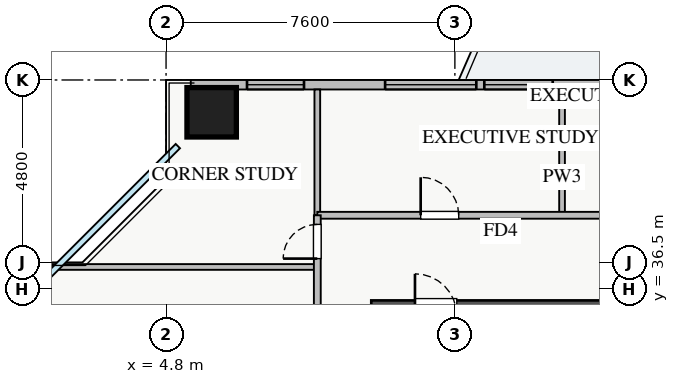
"""IFC4 building model, lengths in metres.
Left out: names, types, materials, properties, quantities, classifications, styles, units other than length and angle.
Written with IfcOpenShell. Run it as: python <this file> out.ifc"""

import sys

from ifc_helpers import new_model, si_unit, direction, frame, frame_2d, origin, origin_2d, place, context, subcontext, project, spatial, rectangle, extrude, source, transform, mapped, element, fill, save


model = new_model("IFC4")
c1 = context("Model", 3, precision=1e-05, world=origin(), true_north=direction((0.0, 1.0)))
c2 = subcontext(c1, "Body", "Model", "MODEL_VIEW")
j1 = project(units=[si_unit("LENGTHUNIT", "METRE"), si_unit("PLANEANGLEUNIT", "RADIAN")], contexts=[c1])
p1 = place(None, origin())
s1 = spatial("IfcSite", under=j1, at=p1, CompositionType="ELEMENT")
p2 = place(p1, origin())
s2 = spatial("IfcBuilding", under=s1, at=p2, CompositionType="ELEMENT")
p3 = place(p2, frame((0.0, 0.0, 73.0)))
s3 = spatial("IfcBuildingStorey", under=s2, at=p3, CompositionType="ELEMENT", Elevation=73.0)
p4 = place(p3, frame((10.2, 35.8, 0.0), z_axis=(0.0, 0.0, 1.0), x_axis=(1.0, 0.0, 0.0)))
e1 = element("IfcWall", 1, at=p4, inside=s3, PredefinedType="SHEAR", context=c2, shape_type="SweptSolid", body=[
    extrude(rectangle(XDim=17.6, YDim=0.8, at=frame_2d((8.8, 0.0))), origin(), (0.0, 0.0, 1.0), 3.25),
])
p5 = place(p4, frame((1.15, 0.0, 0.0)))
e2 = element("IfcOpeningElement", 2, at=p5, cuts=e1, PredefinedType="OPENING", context=c2, shape_type="SweptSolid", body=[
    extrude(rectangle(XDim=1.1, YDim=2.05, at=frame_2d((0.55, 1.025))), frame((0.0, 0.41, 0.0), z_axis=(0.0, -1.0, 0.0), x_axis=(1.0, 0.0, 0.0)), (0.0, 0.0, 1.0), 0.82),
])
p6 = place(p4, frame((8.3, 0.0, 0.0)))
e3 = element("IfcOpeningElement", 3, at=p6, cuts=e1, PredefinedType="OPENING", context=c2, shape_type="SweptSolid", body=[
    extrude(rectangle(XDim=1.1, YDim=2.05, at=frame_2d((0.55, 1.025))), frame((0.0, 0.41, 0.0), z_axis=(0.0, -1.0, 0.0), x_axis=(1.0, 0.0, 0.0)), (0.0, 0.0, 1.0), 0.82),
])
p7 = place(p4, frame((10.05, 0.0, 0.0)))
e4 = element("IfcOpeningElement", 4, at=p7, cuts=e1, PredefinedType="OPENING", context=c2, shape_type="SweptSolid", body=[
    extrude(rectangle(XDim=1.1, YDim=2.05, at=frame_2d((0.55, 1.025))), frame((0.0, 0.41, 0.0), z_axis=(0.0, -1.0, 0.0), x_axis=(1.0, 0.0, 0.0)), (0.0, 0.0, 1.0), 0.82),
])
p8 = place(p4, frame((14.74, 0.0, 0.0)))
e5 = element("IfcOpeningElement", 5, at=p8, cuts=e1, PredefinedType="OPENING", context=c2, shape_type="SweptSolid", body=[
    extrude(rectangle(XDim=1.0, YDim=2.05, at=frame_2d((0.5, 1.025))), frame((0.0, 0.41, 0.0), z_axis=(0.0, -1.0, 0.0), x_axis=(1.0, 0.0, 0.0)), (0.0, 0.0, 1.0), 0.82),
])
p9 = place(p4, frame((11.95, 0.0, 0.0)))
e6 = element("IfcOpeningElement", 6, at=p9, cuts=e1, PredefinedType="OPENING", context=c2, shape_type="SweptSolid", body=[
    extrude(rectangle(XDim=1.0, YDim=2.05, at=frame_2d((0.5, 1.025))), frame((0.0, 0.41, 0.0), z_axis=(0.0, -1.0, 0.0), x_axis=(1.0, 0.0, 0.0)), (0.0, 0.0, 1.0), 0.82),
])
p10 = place(p4, frame((13.485, 0.0, 0.0)))
e7 = element("IfcOpeningElement", 7, at=p10, cuts=e1, PredefinedType="OPENING", context=c2, shape_type="SweptSolid", body=[
    extrude(rectangle(XDim=1.0, YDim=2.05, at=frame_2d((0.5, 1.025))), frame((0.0, 0.41, 0.0), z_axis=(0.0, -1.0, 0.0), x_axis=(1.0, 0.0, 0.0)), (0.0, 0.0, 1.0), 0.82),
])
m1 = source(origin(), c2, "Body", "SweptSolid", [
    extrude(rectangle(XDim=1.3, YDim=1.3, at=origin_2d()), origin(), (0.0, 0.0, 1.0), 3.25),
])
p11 = place(p3, frame((6.0, 41.15, 0.0), z_axis=(0.0, 0.0, 1.0), x_axis=(1.0, 0.0, 0.0)))
e8 = element("IfcColumn", 8, at=p11, inside=s3, PredefinedType="COLUMN", context=c2, shape_type="MappedRepresentation", body=[
    mapped(m1, transform((0.0, 0.0, 0.0), x_axis=(1.0, 0.0, 0.0), y_axis=(0.0, 1.0, 0.0), z_axis=(0.0, 0.0, 1.0), scale=1.0)),
])
p12 = place(p3, frame((5.45, 41.875, 0.0), z_axis=(0.0, 0.0, 1.0), x_axis=(1.0, 0.0, 0.0)))
e9 = element("IfcWall", 9, at=p12, inside=s3, PredefinedType="STANDARD", context=c2, shape_type="SweptSolid", body=[
    extrude(rectangle(XDim=27.1, YDim=0.25, at=frame_2d((13.55, 0.0))), origin(), (0.0, 0.0, 1.0), 2.61),
])
p13 = place(p12, frame((14.4, 0.0, 0.0)))
e10 = element("IfcOpeningElement", 10, at=p13, cuts=e9, PredefinedType="OPENING", context=c2, shape_type="SweptSolid", body=[
    extrude(rectangle(XDim=1.2, YDim=2.1, at=frame_2d((0.6, 1.05))), frame((0.0, 0.135, 0.0), z_axis=(0.0, -1.0, 0.0), x_axis=(1.0, 0.0, 0.0)), (0.0, 0.0, 1.0), 0.27),
])
p14 = place(p12, frame((1.48, 0.0, 0.9)))
e11 = element("IfcOpeningElement", 11, at=p14, cuts=e9, PredefinedType="OPENING", context=c2, shape_type="SweptSolid", body=[
    extrude(rectangle(XDim=1.5, YDim=1.5, at=frame_2d((0.75, 0.75))), frame((0.0, 0.135, 0.0), z_axis=(0.0, -1.0, 0.0), x_axis=(1.0, 0.0, 0.0)), (0.0, 0.0, 1.0), 0.27),
])
p15 = place(p12, frame((7.725, 0.0, 0.9)))
e12 = element("IfcOpeningElement", 12, at=p15, cuts=e9, PredefinedType="OPENING", context=c2, shape_type="SweptSolid", body=[
    extrude(rectangle(XDim=1.8, YDim=1.5, at=frame_2d((0.9, 0.75))), frame((0.0, 0.135, 0.0), z_axis=(0.0, -1.0, 0.0), x_axis=(1.0, 0.0, 0.0)), (0.0, 0.0, 1.0), 0.27),
])
p16 = place(p12, frame((17.92, 0.0, 0.9)))
e13 = element("IfcOpeningElement", 13, at=p16, cuts=e9, PredefinedType="OPENING", context=c2, shape_type="SweptSolid", body=[
    extrude(rectangle(XDim=1.5, YDim=1.5, at=frame_2d((0.75, 0.75))), frame((0.0, 0.135, 0.0), z_axis=(0.0, -1.0, 0.0), x_axis=(1.0, 0.0, 0.0)), (0.0, 0.0, 1.0), 0.27),
])
p17 = place(p12, frame((22.663, 0.0, 0.9)))
e14 = element("IfcOpeningElement", 14, at=p17, cuts=e9, PredefinedType="OPENING", context=c2, shape_type="SweptSolid", body=[
    extrude(rectangle(XDim=2.1, YDim=1.48, at=frame_2d((1.05, 0.74))), frame((0.0, 0.135, 0.0), z_axis=(0.0, -1.0, 0.0), x_axis=(1.0, 0.0, 0.0)), (0.0, 0.0, 1.0), 0.27),
])
p18 = place(p12, frame((5.114, 0.0, 0.9)))
e15 = element("IfcOpeningElement", 15, at=p18, cuts=e9, PredefinedType="OPENING", context=c2, shape_type="SweptSolid", body=[
    extrude(rectangle(XDim=2.4, YDim=1.5, at=frame_2d((1.2, 0.75))), frame((0.0, 0.135, 0.0), z_axis=(0.0, -1.0, 0.0), x_axis=(1.0, 0.0, 0.0)), (0.0, 0.0, 1.0), 0.27),
])
p19 = place(p12, frame((10.893, 0.0, 0.9)))
e16 = element("IfcOpeningElement", 16, at=p19, cuts=e9, PredefinedType="OPENING", context=c2, shape_type="SweptSolid", body=[
    extrude(rectangle(XDim=2.4, YDim=1.5, at=frame_2d((1.2, 0.75))), frame((0.0, 0.135, 0.0), z_axis=(0.0, -1.0, 0.0), x_axis=(1.0, 0.0, 0.0)), (0.0, 0.0, 1.0), 0.27),
])
for number, where, z_axis, x_axis in (
    (17, (15.22, 38.44, 0.0), (0.0, 0.0, 1.0), (0.0, 1.0, 0.0)),
    (18, (8.78, 38.44, 0.0), (0.0, 0.0, 1.0), (0.0, 1.0, 0.0)),
):
    element("IfcWall", number, at=place(p3, frame(where, z_axis=z_axis, x_axis=x_axis)), inside=s3, PredefinedType="PARTITIONING", context=c2, shape_type="SweptSolid", body=[
        extrude(rectangle(XDim=3.31, YDim=0.15, at=frame_2d((1.655, 0.0))), origin(), (0.0, 0.0, 1.0), 3.07),
    ])
p20 = place(p3, frame((8.78, 38.44, 0.0), z_axis=(0.0, 0.0, 1.0), x_axis=(1.0, 0.0, 0.0)))
e19 = element("IfcWall", 19, at=p20, inside=s3, PredefinedType="PARTITIONING", context=c2, shape_type="SweptSolid", body=[
    extrude(rectangle(XDim=23.54, YDim=0.18, at=frame_2d((11.77, 0.0))), origin(), (0.0, 0.0, 1.0), 3.07),
])
p21 = place(p20, frame((2.72, 0.0, 0.0)))
e20 = element("IfcOpeningElement", 20, at=p21, cuts=e19, PredefinedType="OPENING", context=c2, shape_type="SweptSolid", body=[
    extrude(rectangle(XDim=1.0, YDim=2.05, at=frame_2d((0.5, 1.025))), frame((0.0, 0.1, 0.0), z_axis=(0.0, -1.0, 0.0), x_axis=(1.0, 0.0, 0.0)), (0.0, 0.0, 1.0), 0.2),
])
p22 = place(p20, frame((9.23, 0.0, 0.0)))
e21 = element("IfcOpeningElement", 21, at=p22, cuts=e19, PredefinedType="OPENING", context=c2, shape_type="SweptSolid", body=[
    extrude(rectangle(XDim=1.0, YDim=2.05, at=frame_2d((0.5, 1.025))), frame((0.0, 0.1, 0.0), z_axis=(0.0, -1.0, 0.0), x_axis=(1.0, 0.0, 0.0)), (0.0, 0.0, 1.0), 0.2),
])
p23 = place(p20, frame((14.84, 0.0, 0.0)))
e22 = element("IfcOpeningElement", 22, at=p23, cuts=e19, PredefinedType="OPENING", context=c2, shape_type="SweptSolid", body=[
    extrude(rectangle(XDim=1.0, YDim=2.05, at=frame_2d((0.5, 1.025))), frame((0.0, 0.1, 0.0), z_axis=(0.0, -1.0, 0.0), x_axis=(1.0, 0.0, 0.0)), (0.0, 0.0, 1.0), 0.2),
])
p24 = place(p20, frame((20.1, 0.0, 0.0)))
e23 = element("IfcOpeningElement", 23, at=p24, cuts=e19, PredefinedType="OPENING", context=c2, shape_type="SweptSolid", body=[
    extrude(rectangle(XDim=1.0, YDim=2.05, at=frame_2d((0.5, 1.025))), frame((0.0, 0.1, 0.0), z_axis=(0.0, -1.0, 0.0), x_axis=(1.0, 0.0, 0.0)), (0.0, 0.0, 1.0), 0.2),
])
p25 = place(p3, frame((0.25, 37.08, 0.0), z_axis=(0.0, 0.0, 1.0), x_axis=(1.0, 0.0, 0.0)))
e24 = element("IfcWall", 24, at=p25, inside=s3, PredefinedType="PARTITIONING", context=c2, shape_type="SweptSolid", body=[
    extrude(rectangle(XDim=8.53, YDim=0.15, at=frame_2d((4.265, 0.0))), origin(), (0.0, 0.0, 1.0), 3.07),
])
p26 = place(p3, frame((8.78, 7.21, 0.0), z_axis=(0.0, 0.0, 1.0), x_axis=(0.0, 1.0, 0.0)))
e25 = element("IfcWall", 25, at=p26, inside=s3, PredefinedType="PARTITIONING", context=c2, shape_type="SweptSolid", body=[
    extrude(rectangle(XDim=31.23, YDim=0.18, at=frame_2d((15.615, 0.0))), origin(), (0.0, 0.0, 1.0), 3.07),
])
p27 = place(p26, frame((30.09, 0.0, 0.0)))
e26 = element("IfcOpeningElement", 26, at=p27, cuts=e25, PredefinedType="OPENING", context=c2, shape_type="SweptSolid", body=[
    extrude(rectangle(XDim=0.9, YDim=2.05, at=frame_2d((0.45, 1.025))), frame((0.0, 0.1, 0.0), z_axis=(0.0, -1.0, 0.0), x_axis=(1.0, 0.0, 0.0)), (0.0, 0.0, 1.0), 0.2),
])
p28 = place(p26, frame((0.24, 0.0, 0.0)))
e27 = element("IfcOpeningElement", 27, at=p28, cuts=e25, PredefinedType="OPENING", context=c2, shape_type="SweptSolid", body=[
    extrude(rectangle(XDim=0.9, YDim=2.05, at=frame_2d((0.45, 1.025))), frame((0.0, 0.1, 0.0), z_axis=(0.0, -1.0, 0.0), x_axis=(1.0, 0.0, 0.0)), (0.0, 0.0, 1.0), 0.2),
])
p29 = place(p26, frame((2.84, 0.0, 0.0)))
e28 = element("IfcOpeningElement", 28, at=p29, cuts=e25, PredefinedType="OPENING", context=c2, shape_type="SweptSolid", body=[
    extrude(rectangle(XDim=1.0, YDim=2.05, at=frame_2d((0.5, 1.025))), frame((0.0, 0.1, 0.0), z_axis=(0.0, -1.0, 0.0), x_axis=(1.0, 0.0, 0.0)), (0.0, 0.0, 1.0), 0.2),
])
p30 = place(p26, frame((12.11, 0.0, 0.0)))
e29 = element("IfcOpeningElement", 29, at=p30, cuts=e25, PredefinedType="OPENING", context=c2, shape_type="SweptSolid", body=[
    extrude(rectangle(XDim=1.0, YDim=2.05, at=frame_2d((0.5, 1.025))), frame((0.0, 0.1, 0.0), z_axis=(0.0, -1.0, 0.0), x_axis=(1.0, 0.0, 0.0)), (0.0, 0.0, 1.0), 0.2),
])
p31 = place(p26, frame((24.62, 0.0, 0.0)))
e30 = element("IfcOpeningElement", 30, at=p31, cuts=e25, PredefinedType="OPENING", context=c2, shape_type="SweptSolid", body=[
    extrude(rectangle(XDim=1.0, YDim=2.05, at=frame_2d((0.5, 1.025))), frame((0.0, 0.1, 0.0), z_axis=(0.0, -1.0, 0.0), x_axis=(1.0, 0.0, 0.0)), (0.0, 0.0, 1.0), 0.2),
])
m2 = source(origin(), c2, "Body", "SweptSolid", [
    extrude(rectangle(XDim=1.5, YDim=1.5, at=frame_2d((0.75, 0.75))), frame((0.0, 0.03, 0.0), z_axis=(0.0, -1.0, 0.0), x_axis=(1.0, 0.0, 0.0)), (0.0, 0.0, 1.0), 0.06),
])
p32 = place(p14, origin())
e31 = element("IfcWindow", 31, at=p32, inside=s3, PartitioningType="TRIPLE_PANEL_VERTICAL", PredefinedType="WINDOW", context=c2, shape_type="MappedRepresentation", body=[
    mapped(m2, transform((0.0, 0.0, 0.0), x_axis=(1.0, 0.0, 0.0), y_axis=(0.0, 1.0, 0.0), z_axis=(0.0, 0.0, 1.0), scale=1.0)),
])
fill(e11, e31)
m3 = source(origin(), c2, "Body", "SweptSolid", [
    extrude(rectangle(XDim=1.8, YDim=1.5, at=frame_2d((0.9, 0.75))), frame((0.0, 0.03, 0.0), z_axis=(0.0, -1.0, 0.0), x_axis=(1.0, 0.0, 0.0)), (0.0, 0.0, 1.0), 0.06),
])
p33 = place(p15, origin())
e32 = element("IfcWindow", 32, at=p33, inside=s3, PartitioningType="DOUBLE_PANEL_VERTICAL", PredefinedType="WINDOW", context=c2, shape_type="MappedRepresentation", body=[
    mapped(m3, transform((0.0, 0.0, 0.0), x_axis=(1.0, 0.0, 0.0), y_axis=(0.0, 1.0, 0.0), z_axis=(0.0, 0.0, 1.0), scale=1.0)),
])
fill(e12, e32)
m4 = source(origin(), c2, "Body", "SweptSolid", [
    extrude(rectangle(XDim=1.0, YDim=2.05, at=frame_2d((0.5, 1.025))), frame((0.0, 0.025, 0.0), z_axis=(0.0, -1.0, 0.0), x_axis=(1.0, 0.0, 0.0)), (0.0, 0.0, 1.0), 0.05),
])
p34 = place(p21, origin())
e33 = element("IfcDoor", 33, at=p34, inside=s3, OperationType="SINGLE_SWING_LEFT", PredefinedType="DOOR", context=c2, shape_type="MappedRepresentation", body=[
    mapped(m4, transform((0.0, 0.0, 0.0), x_axis=(1.0, 0.0, 0.0), y_axis=(0.0, 1.0, 0.0), z_axis=(0.0, 0.0, 1.0), scale=1.0)),
])
fill(e20, e33)
m5 = source(origin(), c2, "Body", "SweptSolid", [
    extrude(rectangle(XDim=0.9, YDim=2.05, at=frame_2d((0.45, 1.025))), frame((0.0, 0.025, 0.0), z_axis=(0.0, -1.0, 0.0), x_axis=(1.0, 0.0, 0.0)), (0.0, 0.0, 1.0), 0.05),
])
p35 = place(p27, origin())
e34 = element("IfcDoor", 34, at=p35, inside=s3, OperationType="SINGLE_SWING_LEFT", PredefinedType="DOOR", context=c2, shape_type="MappedRepresentation", body=[
    mapped(m5, transform((0.0, 0.0, 0.0), x_axis=(1.0, 0.0, 0.0), y_axis=(0.0, 1.0, 0.0), z_axis=(0.0, 0.0, 1.0), scale=1.0)),
])
fill(e26, e34)
m6 = source(origin(), c2, "Body", "SweptSolid", [
    extrude(rectangle(XDim=2.4, YDim=1.5, at=frame_2d((1.2, 0.75))), frame((0.0, 0.03, 0.0), z_axis=(0.0, -1.0, 0.0), x_axis=(1.0, 0.0, 0.0)), (0.0, 0.0, 1.0), 0.06),
])
p36 = place(p18, origin())
e35 = element("IfcWindow", 35, at=p36, inside=s3, PartitioningType="TRIPLE_PANEL_VERTICAL", PredefinedType="WINDOW", context=c2, shape_type="MappedRepresentation", body=[
    mapped(m6, transform((0.0, 0.0, 0.0), x_axis=(1.0, 0.0, 0.0), y_axis=(0.0, 1.0, 0.0), z_axis=(0.0, 0.0, 1.0), scale=1.0)),
])
fill(e15, e35)
save(model, sys.argv[1])
